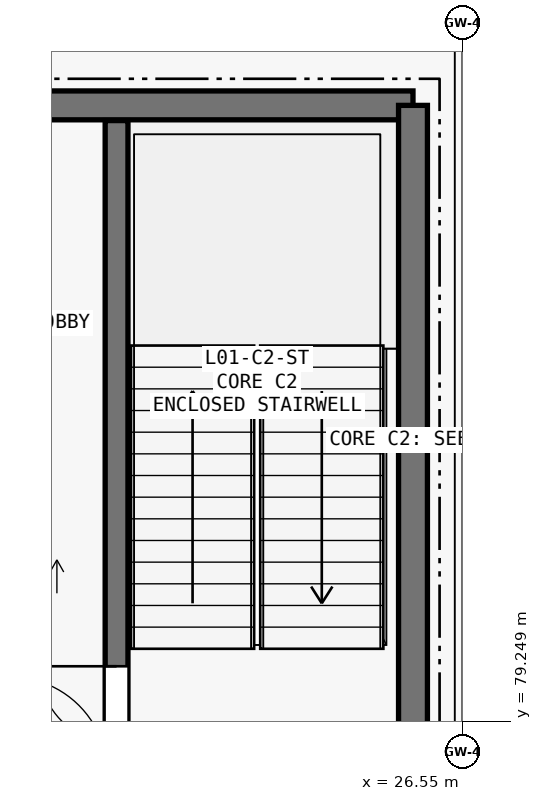
"""IFC4 building model, lengths in metres.
Left out: names, types, materials, properties, quantities, classifications, styles, units other than length and angle.
Written with IfcOpenShell. Run it as: python <this file> out.ifc"""

import sys

from ifc_helpers import new_model, si_unit, direction, frame, frame_2d, origin, place, context, subcontext, project, spatial, rectangle, extrude, element, fill, save


model = new_model("IFC4")
c1 = context("Model", 3, precision=1e-05, world=origin(), true_north=direction((0.0, 1.0)))
c2 = subcontext(c1, "Body", "Model", "MODEL_VIEW")
j1 = project(units=[si_unit("LENGTHUNIT", "METRE"), si_unit("PLANEANGLEUNIT", "RADIAN")], contexts=[c1])
p1 = place(None, origin())
s1 = spatial("IfcSite", under=j1, at=p1, CompositionType="ELEMENT")
p2 = place(p1, origin())
s2 = spatial("IfcBuilding", under=s1, at=p2, CompositionType="ELEMENT")
p3 = place(p2, frame((0.0, 0.0, 6.0)))
s3 = spatial("IfcBuildingStorey", under=s2, at=p3, CompositionType="ELEMENT", Elevation=6.0)
p4 = place(p3, frame((25.9, 87.35, 0.0), z_axis=(0.0, 0.0, 1.0), x_axis=(-1.0, 0.0, 0.0)))
e1 = element("IfcWall", 1, at=p4, inside=s3, PredefinedType="SHEAR", context=c2, shape_type="SweptSolid", body=[
    extrude(rectangle(XDim=7.55, YDim=0.38, at=frame_2d((3.775, 0.0))), origin(), (0.0, 0.0, 1.0), 4.8),
])
p5 = place(p3, frame((25.9, 78.55, 0.0), z_axis=(0.0, 0.0, 1.0), x_axis=(0.0, 1.0, 0.0)))
e2 = element("IfcWall", 2, at=p5, inside=s3, PredefinedType="SHEAR", context=c2, shape_type="SweptSolid", body=[
    extrude(rectangle(XDim=8.8, YDim=0.38, at=frame_2d((4.4, 0.0))), origin(), (0.0, 0.0, 1.0), 4.8),
])
p6 = place(p3, frame((22.0, 78.75, 0.0), z_axis=(0.0, 0.0, 1.0), x_axis=(0.0, 1.0, 0.0)))
e3 = element("IfcWall", 3, at=p6, inside=s3, PredefinedType="SHEAR", context=c2, shape_type="SweptSolid", body=[
    extrude(rectangle(XDim=8.4, YDim=0.3, at=frame_2d((4.2, 0.0))), origin(), (0.0, 0.0, 1.0), 4.8),
])
p7 = place(p6, frame((0.2, 0.0, 0.0)))
e4 = element("IfcOpeningElement", 4, at=p7, cuts=e3, PredefinedType="OPENING", context=c2, shape_type="SweptSolid", body=[
    extrude(rectangle(XDim=1.02, YDim=2.1, at=frame_2d((0.51, 1.05))), frame((0.0, 0.16, 0.0), z_axis=(0.0, -1.0, 0.0), x_axis=(1.0, 0.0, 0.0)), (0.0, 0.0, 1.0), 0.32),
])
p8 = place(p7, origin())
e5 = element("IfcDoor", 5, at=p8, inside=s3, OperationType="SINGLE_SWING_RIGHT", PredefinedType="DOOR", context=c2, shape_type="SweptSolid", body=[
    extrude(rectangle(XDim=1.02, YDim=2.1, at=frame_2d((0.51, 1.05))), frame((0.0, 0.025, 0.0), z_axis=(0.0, -1.0, 0.0), x_axis=(1.0, 0.0, 0.0)), (0.0, 0.0, 1.0), 0.05),
])
fill(e4, e5)
save(model, sys.argv[1])
